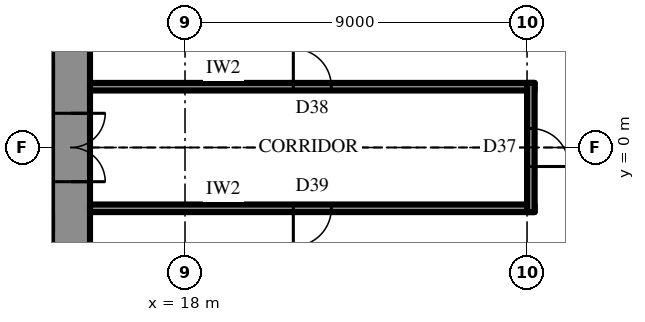
"""IFC4 building model, lengths in metres.
Left out: names, types, materials, properties, quantities, classifications, styles, units other than length and angle.
Written with IfcOpenShell. Run it as: python <this file> out.ifc"""

import sys

from ifc_helpers import new_model, si_unit, direction, frame, frame_2d, origin, place, context, subcontext, project, spatial, rectangle, extrude, element, fill, save


model = new_model("IFC4")
c1 = context("Model", 3, precision=1e-05, world=origin(), true_north=direction((0.0, 1.0)))
c2 = subcontext(c1, "Body", "Model", "MODEL_VIEW")
j1 = project(units=[si_unit("LENGTHUNIT", "METRE"), si_unit("PLANEANGLEUNIT", "RADIAN")], contexts=[c1])
p1 = place(None, origin())
s1 = spatial("IfcSite", under=j1, at=p1, CompositionType="ELEMENT")
p2 = place(p1, origin())
s2 = spatial("IfcBuilding", under=s1, at=p2, CompositionType="ELEMENT")
p3 = place(p2, frame((0.0, 0.0, 282.7)))
s3 = spatial("IfcBuildingStorey", under=s2, at=p3, CompositionType="ELEMENT", Elevation=282.7)
p4 = place(p3, frame((15.0, -10.7, 0.0), z_axis=(0.0, 0.0, 1.0), x_axis=(0.0, 1.0, 0.0)))
e1 = element("IfcWall", 1, at=p4, inside=s3, PredefinedType="SHEAR", context=c2, shape_type="SweptSolid", body=[
    extrude(rectangle(XDim=21.4, YDim=1.0, at=frame_2d((10.7, 0.0))), origin(), (0.0, 0.0, 1.0), 4.2),
])
p5 = place(p4, frame((9.8, 0.0, 0.0)))
e2 = element("IfcOpeningElement", 2, at=p5, cuts=e1, PredefinedType="OPENING", context=c2, shape_type="SweptSolid", body=[
    extrude(rectangle(XDim=1.8, YDim=2.4, at=frame_2d((0.9, 1.2))), frame((0.0, 0.51, 0.0), z_axis=(0.0, -1.0, 0.0), x_axis=(1.0, 0.0, 0.0)), (0.0, 0.0, 1.0), 1.02),
])
p6 = place(p3, frame((12.3, 2.0, 0.0), z_axis=(0.0, 0.0, 1.0), x_axis=(1.0, 0.0, 0.0)))
e3 = element("IfcWall", 3, at=p6, inside=s3, PredefinedType="SHEAR", context=c2, shape_type="SweptSolid", body=[
    extrude(rectangle(XDim=2.2, YDim=0.5, at=frame_2d((1.1, 0.0))), origin(), (0.0, 0.0, 1.0), 4.2),
])
p7 = place(p6, frame((0.8, 0.0, 0.0)))
e4 = element("IfcOpeningElement", 4, at=p7, cuts=e3, PredefinedType="OPENING", context=c2, shape_type="SweptSolid", body=[
    extrude(rectangle(XDim=0.9, YDim=2.2, at=frame_2d((0.45, 1.1))), frame((0.0, 0.26, 0.0), z_axis=(0.0, -1.0, 0.0), x_axis=(1.0, 0.0, 0.0)), (0.0, 0.0, 1.0), 0.52),
])
p8 = place(p3, frame((15.5, 1.6, 0.0), z_axis=(0.0, 0.0, 1.0), x_axis=(1.0, 0.0, 0.0)))
e5 = element("IfcWall", 5, at=p8, inside=s3, PredefinedType="PARTITIONING", context=c2, shape_type="SweptSolid", body=[
    extrude(rectangle(XDim=11.7, YDim=0.2, at=frame_2d((5.85, 0.0))), origin(), (0.0, 0.0, 1.0), 4.0),
])
p9 = place(p8, frame((5.35, 0.0, 0.0)))
e6 = element("IfcOpeningElement", 6, at=p9, cuts=e5, PredefinedType="OPENING", context=c2, shape_type="SweptSolid", body=[
    extrude(rectangle(XDim=1.0, YDim=2.2, at=frame_2d((0.5, 1.1))), frame((0.0, 0.11, 0.0), z_axis=(0.0, -1.0, 0.0), x_axis=(1.0, 0.0, 0.0)), (0.0, 0.0, 1.0), 0.22),
])
p10 = place(p3, frame((15.5, -1.6, 0.0), z_axis=(0.0, 0.0, 1.0), x_axis=(1.0, 0.0, 0.0)))
e7 = element("IfcWall", 7, at=p10, inside=s3, PredefinedType="PARTITIONING", context=c2, shape_type="SweptSolid", body=[
    extrude(rectangle(XDim=11.7, YDim=0.2, at=frame_2d((5.85, 0.0))), origin(), (0.0, 0.0, 1.0), 4.0),
])
p11 = place(p10, frame((5.35, 0.0, 0.0)))
e8 = element("IfcOpeningElement", 8, at=p11, cuts=e7, PredefinedType="OPENING", context=c2, shape_type="SweptSolid", body=[
    extrude(rectangle(XDim=1.0, YDim=2.2, at=frame_2d((0.5, 1.1))), frame((0.0, 0.11, 0.0), z_axis=(0.0, -1.0, 0.0), x_axis=(1.0, 0.0, 0.0)), (0.0, 0.0, 1.0), 0.22),
])
p12 = place(p3, frame((27.1, -1.7, 0.0), z_axis=(0.0, 0.0, 1.0), x_axis=(0.0, 1.0, 0.0)))
e9 = element("IfcWall", 9, at=p12, inside=s3, PredefinedType="PARTITIONING", context=c2, shape_type="SweptSolid", body=[
    extrude(rectangle(XDim=3.4, YDim=0.2, at=frame_2d((1.7, 0.0))), origin(), (0.0, 0.0, 1.0), 4.0),
])
p13 = place(p12, frame((1.2, 0.0, 0.0)))
e10 = element("IfcOpeningElement", 10, at=p13, cuts=e9, PredefinedType="OPENING", context=c2, shape_type="SweptSolid", body=[
    extrude(rectangle(XDim=1.0, YDim=2.2, at=frame_2d((0.5, 1.1))), frame((0.0, 0.11, 0.0), z_axis=(0.0, -1.0, 0.0), x_axis=(1.0, 0.0, 0.0)), (0.0, 0.0, 1.0), 0.22),
])
p14 = place(p5, frame((1.8, 0.0, 0.0), z_axis=(0.0, 0.0, 1.0), x_axis=(-1.0, 0.0, 0.0)))
e11 = element("IfcDoor", 11, at=p14, inside=s3, OperationType="DOUBLE_DOOR_SINGLE_SWING", PredefinedType="DOOR", context=c2, shape_type="SweptSolid", body=[
    extrude(rectangle(XDim=1.8, YDim=2.4, at=frame_2d((0.9, 1.2))), frame((0.0, 0.025, 0.0), z_axis=(0.0, -1.0, 0.0), x_axis=(1.0, 0.0, 0.0)), (0.0, 0.0, 1.0), 0.05),
])
fill(e2, e11)
p15 = place(p9, origin())
e12 = element("IfcDoor", 12, at=p15, inside=s3, OperationType="SINGLE_SWING_RIGHT", PredefinedType="DOOR", context=c2, shape_type="SweptSolid", body=[
    extrude(rectangle(XDim=1.0, YDim=2.2, at=frame_2d((0.5, 1.1))), frame((0.0, 0.025, 0.0), z_axis=(0.0, -1.0, 0.0), x_axis=(1.0, 0.0, 0.0)), (0.0, 0.0, 1.0), 0.05),
])
fill(e6, e12)
p16 = place(p11, frame((1.0, 0.0, 0.0), z_axis=(0.0, 0.0, 1.0), x_axis=(-1.0, 0.0, 0.0)))
e13 = element("IfcDoor", 13, at=p16, inside=s3, OperationType="SINGLE_SWING_LEFT", PredefinedType="DOOR", context=c2, shape_type="SweptSolid", body=[
    extrude(rectangle(XDim=1.0, YDim=2.2, at=frame_2d((0.5, 1.1))), frame((0.0, 0.025, 0.0), z_axis=(0.0, -1.0, 0.0), x_axis=(1.0, 0.0, 0.0)), (0.0, 0.0, 1.0), 0.05),
])
fill(e8, e13)
p17 = place(p13, frame((1.0, 0.0, 0.0), z_axis=(0.0, 0.0, 1.0), x_axis=(-1.0, 0.0, 0.0)))
e14 = element("IfcDoor", 14, at=p17, inside=s3, OperationType="SINGLE_SWING_LEFT", PredefinedType="DOOR", context=c2, shape_type="SweptSolid", body=[
    extrude(rectangle(XDim=1.0, YDim=2.2, at=frame_2d((0.5, 1.1))), frame((0.0, 0.025, 0.0), z_axis=(0.0, -1.0, 0.0), x_axis=(1.0, 0.0, 0.0)), (0.0, 0.0, 1.0), 0.05),
])
fill(e10, e14)
save(model, sys.argv[1])
